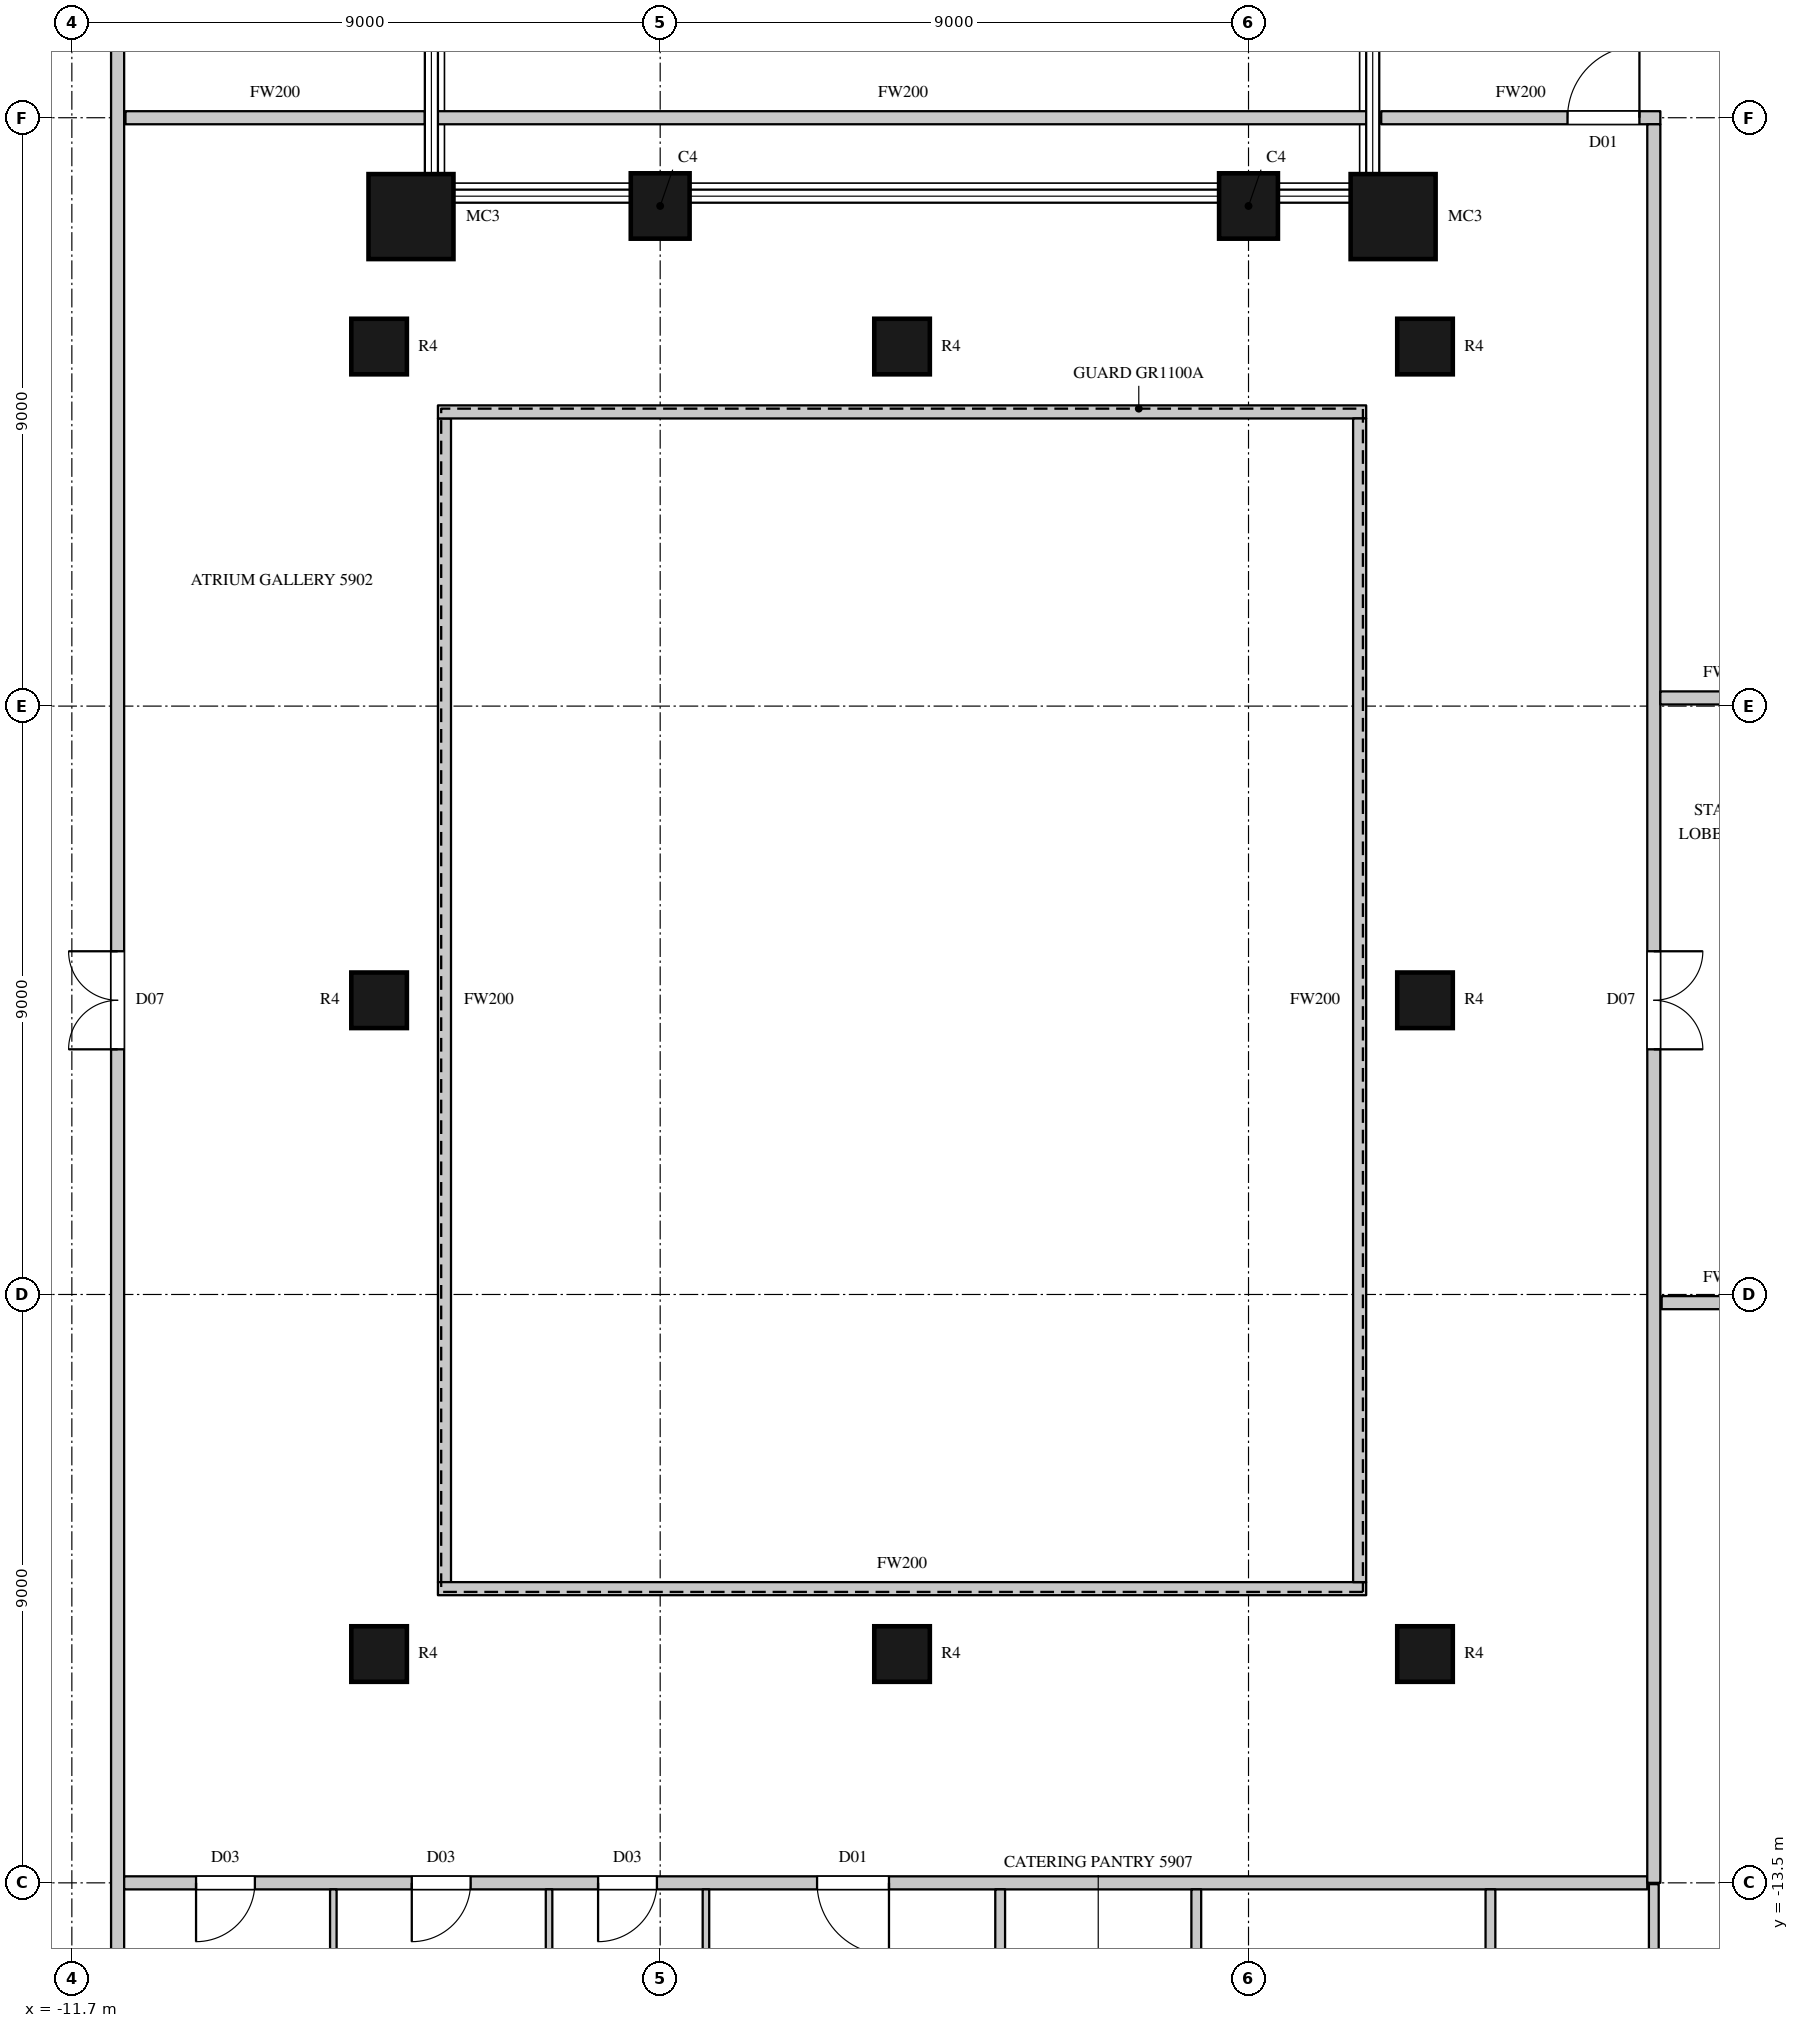
"""IFC4 building model, lengths in metres.
Left out: names, types, materials, properties, quantities, classifications, styles, units other than length and angle.
Written with IfcOpenShell. Run it as: python <this file> out.ifc"""

import sys

from ifc_helpers import new_model, si_unit, direction, frame, frame_2d, origin, origin_2d, place, context, subcontext, project, spatial, rectangle, circle, extrude, element, fill, save


model = new_model("IFC4")
c1 = context("Model", 3, precision=1e-05, world=origin(), true_north=direction((0.0, 1.0)))
c2 = subcontext(c1, "Body", "Model", "MODEL_VIEW")
j1 = project(units=[si_unit("LENGTHUNIT", "METRE"), si_unit("PLANEANGLEUNIT", "RADIAN")], contexts=[c1])
p1 = place(None, origin())
s1 = spatial("IfcSite", under=j1, at=p1, CompositionType="ELEMENT")
p2 = place(p1, origin())
s2 = spatial("IfcBuilding", under=s1, at=p2, CompositionType="ELEMENT")
p3 = place(p2, frame((0.0, 0.0, 263.9)))
s3 = spatial("IfcBuildingStorey", under=s2, at=p3, CompositionType="ELEMENT", Elevation=263.9)
p4 = place(p3, frame((8.512, 11.988, 0.0), z_axis=(0.0, 0.0, 1.0), x_axis=(1.0, 0.0, 0.0)))
e1 = element("IfcColumn", 1, at=p4, inside=s3, PredefinedType="COLUMN", context=c2, shape_type="SweptSolid", body=[
    extrude(circle(Radius=0.65, at=origin_2d()), origin(), (0.0, 0.0, 1.0), 4.1),
])
for number, where, z_axis, x_axis in (
    (2, (6.3, 12.15, 0.0), (0.0, 0.0, 1.0), (-1.0, 0.0, 0.0)),
    (3, (-2.7, 12.15, 0.0), (0.0, 0.0, 1.0), (-1.0, 0.0, 0.0)),
):
    element("IfcColumn", number, at=place(p3, frame(where, z_axis=z_axis, x_axis=x_axis)), inside=s3, PredefinedType="COLUMN", context=c2, shape_type="SweptSolid", body=[
        extrude(rectangle(XDim=0.9, YDim=1.0, at=origin_2d()), origin(), (0.0, 0.0, 1.0), 4.1),
    ])
p5 = place(p3, frame((-6.512, 11.988, 0.0), z_axis=(0.0, 0.0, 1.0), x_axis=(1.0, 0.0, 0.0)))
e4 = element("IfcColumn", 4, at=p5, inside=s3, PredefinedType="COLUMN", context=c2, shape_type="SweptSolid", body=[
    extrude(circle(Radius=0.65, at=origin_2d()), origin(), (0.0, 0.0, 1.0), 4.1),
])
for number, where, z_axis, x_axis in (
    (5, (-7.0, -10.0, 0.0), (0.0, 0.0, 1.0), (1.0, 0.0, 0.0)),
    (6, (-7.0, 0.0, 0.0), (0.0, 0.0, 1.0), (1.0, 0.0, 0.0)),
    (7, (-7.0, 10.0, 0.0), (0.0, 0.0, 1.0), (1.0, 0.0, 0.0)),
    (8, (1.0, -10.0, 0.0), (0.0, 0.0, 1.0), (1.0, 0.0, 0.0)),
    (9, (1.0, 10.0, 0.0), (0.0, 0.0, 1.0), (1.0, 0.0, 0.0)),
    (10, (9.0, -10.0, 0.0), (0.0, 0.0, 1.0), (1.0, 0.0, 0.0)),
    (11, (9.0, 0.0, 0.0), (0.0, 0.0, 1.0), (1.0, 0.0, 0.0)),
    (12, (9.0, 10.0, 0.0), (0.0, 0.0, 1.0), (1.0, 0.0, 0.0)),
):
    element("IfcColumn", number, at=place(p3, frame(where, z_axis=z_axis, x_axis=x_axis)), inside=s3, PredefinedType="COLUMN", context=c2, shape_type="SweptSolid", body=[
        extrude(circle(Radius=0.425, at=origin_2d()), origin(), (0.0, 0.0, 1.0), 4.1),
    ])
p6 = place(p3, frame((-11.0, -14.8, 0.0), z_axis=(0.0, 0.0, 1.0), x_axis=(0.0, 1.0, 0.0)))
e13 = element("IfcWall", 13, at=p6, inside=s3, PredefinedType="PARTITIONING", context=c2, shape_type="SweptSolid", body=[
    extrude(rectangle(XDim=29.5, YDim=0.2, at=frame_2d((14.75, 0.0))), origin(), (0.0, 0.0, 1.0), 3.8),
])
p7 = place(p6, frame((14.05, 0.0, 0.0)))
e14 = element("IfcOpeningElement", 14, at=p7, cuts=e13, PredefinedType="OPENING", context=c2, shape_type="SweptSolid", body=[
    extrude(rectangle(XDim=1.5, YDim=2.4, at=frame_2d((0.75, 1.2))), frame((0.0, 0.11, 0.0), z_axis=(0.0, -1.0, 0.0), x_axis=(1.0, 0.0, 0.0)), (0.0, 0.0, 1.0), 0.22),
])
p8 = place(p3, frame((-10.9, -13.5, 0.0), z_axis=(0.0, 0.0, 1.0), x_axis=(1.0, 0.0, 0.0)))
e15 = element("IfcWall", 15, at=p8, inside=s3, PredefinedType="PARTITIONING", context=c2, shape_type="SweptSolid", body=[
    extrude(rectangle(XDim=23.3, YDim=0.2, at=frame_2d((11.65, 0.0))), origin(), (0.0, 0.0, 1.0), 3.8),
])
p9 = place(p8, frame((1.1, 0.0, 0.0)))
e16 = element("IfcOpeningElement", 16, at=p9, cuts=e15, PredefinedType="OPENING", context=c2, shape_type="SweptSolid", body=[
    extrude(rectangle(XDim=0.9, YDim=2.2, at=frame_2d((0.45, 1.1))), frame((0.0, 0.11, 0.0), z_axis=(0.0, -1.0, 0.0), x_axis=(1.0, 0.0, 0.0)), (0.0, 0.0, 1.0), 0.22),
])
p10 = place(p8, frame((4.4, 0.0, 0.0)))
e17 = element("IfcOpeningElement", 17, at=p10, cuts=e15, PredefinedType="OPENING", context=c2, shape_type="SweptSolid", body=[
    extrude(rectangle(XDim=0.9, YDim=2.2, at=frame_2d((0.45, 1.1))), frame((0.0, 0.11, 0.0), z_axis=(0.0, -1.0, 0.0), x_axis=(1.0, 0.0, 0.0)), (0.0, 0.0, 1.0), 0.22),
])
p11 = place(p8, frame((7.25, 0.0, 0.0)))
e18 = element("IfcOpeningElement", 18, at=p11, cuts=e15, PredefinedType="OPENING", context=c2, shape_type="SweptSolid", body=[
    extrude(rectangle(XDim=0.9, YDim=2.2, at=frame_2d((0.45, 1.1))), frame((0.0, 0.11, 0.0), z_axis=(0.0, -1.0, 0.0), x_axis=(1.0, 0.0, 0.0)), (0.0, 0.0, 1.0), 0.22),
])
p12 = place(p8, frame((10.6, 0.0, 0.0)))
e19 = element("IfcOpeningElement", 19, at=p12, cuts=e15, PredefinedType="OPENING", context=c2, shape_type="SweptSolid", body=[
    extrude(rectangle(XDim=1.1, YDim=2.4, at=frame_2d((0.55, 1.2))), frame((0.0, 0.11, 0.0), z_axis=(0.0, -1.0, 0.0), x_axis=(1.0, 0.0, 0.0)), (0.0, 0.0, 1.0), 0.22),
])
p13 = place(p3, frame((-10.88, 13.5, 0.0), z_axis=(0.0, 0.0, 1.0), x_axis=(1.0, 0.0, 0.0)))
e20 = element("IfcWall", 20, at=p13, inside=s3, PredefinedType="PARTITIONING", context=c2, shape_type="SweptSolid", body=[
    extrude(rectangle(XDim=4.58, YDim=0.2, at=frame_2d((2.29, 0.0))), origin(), (0.0, 0.0, 1.0), 3.8),
])
p14 = place(p3, frame((-6.27, 13.5, 0.0), z_axis=(0.0, 0.0, 1.0), x_axis=(1.0, 0.0, 0.0)))
e21 = element("IfcWall", 21, at=p14, inside=s3, PredefinedType="PARTITIONING", context=c2, shape_type="SweptSolid", body=[
    extrude(rectangle(XDim=14.57, YDim=0.2, at=frame_2d((7.285, 0.0))), origin(), (0.0, 0.0, 1.0), 3.8),
])
p15 = place(p3, frame((-6.0, -8.9, 0.0), z_axis=(0.0, 0.0, 1.0), x_axis=(0.0, 1.0, 0.0)))
e22 = element("IfcWall", 22, at=p15, inside=s3, PredefinedType="PARTITIONING", context=c2, shape_type="SweptSolid", body=[
    extrude(rectangle(XDim=17.8, YDim=0.2, at=frame_2d((8.9, 0.0))), origin(), (0.0, 0.0, 1.0), 3.8),
])
for number, where, z_axis, x_axis in (
    (23, (-6.1, -9.0, 0.0), (0.0, 0.0, 1.0), (1.0, 0.0, 0.0)),
    (24, (-6.1, 9.0, 0.0), (0.0, 0.0, 1.0), (1.0, 0.0, 0.0)),
):
    element("IfcWall", number, at=place(p3, frame(where, z_axis=z_axis, x_axis=x_axis)), inside=s3, PredefinedType="PARTITIONING", context=c2, shape_type="SweptSolid", body=[
        extrude(rectangle(XDim=14.2, YDim=0.2, at=frame_2d((7.1, 0.0))), origin(), (0.0, 0.0, 1.0), 3.8),
    ])
p16 = place(p3, frame((8.0, -8.9, 0.0), z_axis=(0.0, 0.0, 1.0), x_axis=(0.0, 1.0, 0.0)))
e25 = element("IfcWall", 25, at=p16, inside=s3, PredefinedType="PARTITIONING", context=c2, shape_type="SweptSolid", body=[
    extrude(rectangle(XDim=17.8, YDim=0.2, at=frame_2d((8.9, 0.0))), origin(), (0.0, 0.0, 1.0), 3.8),
])
p17 = place(p3, frame((8.33, 13.5, 0.0), z_axis=(0.0, 0.0, 1.0), x_axis=(1.0, 0.0, 0.0)))
e26 = element("IfcWall", 26, at=p17, inside=s3, PredefinedType="PARTITIONING", context=c2, shape_type="SweptSolid", body=[
    extrude(rectangle(XDim=4.27, YDim=0.2, at=frame_2d((2.135, 0.0))), origin(), (0.0, 0.0, 1.0), 3.8),
])
p18 = place(p17, frame((2.85, 0.0, 0.0)))
e27 = element("IfcOpeningElement", 27, at=p18, cuts=e26, PredefinedType="OPENING", context=c2, shape_type="SweptSolid", body=[
    extrude(rectangle(XDim=1.1, YDim=2.4, at=frame_2d((0.55, 1.2))), frame((0.0, 0.11, 0.0), z_axis=(0.0, -1.0, 0.0), x_axis=(1.0, 0.0, 0.0)), (0.0, 0.0, 1.0), 0.22),
])
p19 = place(p3, frame((12.5, -13.5, 0.0), z_axis=(0.0, 0.0, 1.0), x_axis=(0.0, 1.0, 0.0)))
e28 = element("IfcWall", 28, at=p19, inside=s3, PredefinedType="PARTITIONING", context=c2, shape_type="SweptSolid", body=[
    extrude(rectangle(XDim=26.9, YDim=0.2, at=frame_2d((13.45, 0.0))), origin(), (0.0, 0.0, 1.0), 3.8),
])
p20 = place(p19, frame((12.75, 0.0, 0.0)))
e29 = element("IfcOpeningElement", 29, at=p20, cuts=e28, PredefinedType="OPENING", context=c2, shape_type="SweptSolid", body=[
    extrude(rectangle(XDim=1.5, YDim=2.4, at=frame_2d((0.75, 1.2))), frame((0.0, 0.11, 0.0), z_axis=(0.0, -1.0, 0.0), x_axis=(1.0, 0.0, 0.0)), (0.0, 0.0, 1.0), 0.22),
])
p21 = place(p3, frame((12.6, 4.625, 0.0), z_axis=(0.0, 0.0, 1.0), x_axis=(1.0, 0.0, 0.0)))
e30 = element("IfcWall", 30, at=p21, inside=s3, PredefinedType="PARTITIONING", context=c2, shape_type="SweptSolid", body=[
    extrude(rectangle(XDim=2.075, YDim=0.2, at=frame_2d((1.038, 0.0))), origin(), (0.0, 0.0, 1.0), 3.8),
])
p22 = place(p3, frame((12.62, -4.625, 0.0), z_axis=(0.0, 0.0, 1.0), x_axis=(1.0, 0.0, 0.0)))
e31 = element("IfcWall", 31, at=p22, inside=s3, PredefinedType="PARTITIONING", context=c2, shape_type="SweptSolid", body=[
    extrude(rectangle(XDim=2.035, YDim=0.2, at=frame_2d((1.018, 0.0))), origin(), (0.0, 0.0, 1.0), 3.8),
])
p23 = place(p3, frame((2.501, -17.625, 0.0), z_axis=(0.0, 0.0, 1.0), x_axis=(0.0, 1.0, 0.0)))
e32 = element("IfcWall", 32, at=p23, inside=s3, PredefinedType="PARTITIONING", context=c2, shape_type="SweptSolid", body=[
    extrude(rectangle(XDim=4.025, YDim=0.15, at=frame_2d((2.012, 0.0))), origin(), (0.0, 0.0, 1.0), 3.8),
])
p24 = place(p23, frame((1.55, 0.0, 0.0)))
e33 = element("IfcOpeningElement", 33, at=p24, cuts=e32, PredefinedType="OPENING", context=c2, shape_type="SweptSolid", body=[
    extrude(rectangle(XDim=0.95, YDim=2.2, at=frame_2d((0.475, 1.1))), frame((0.0, 0.085, 0.0), z_axis=(0.0, -1.0, 0.0), x_axis=(1.0, 0.0, 0.0)), (0.0, 0.0, 1.0), 0.17),
])
for number, where, z_axis, x_axis in (
    (34, (5.501, -17.625, 0.0), (0.0, 0.0, 1.0), (0.0, 1.0, 0.0)),
    (35, (10.001, -17.625, 0.0), (0.0, 0.0, 1.0), (0.0, 1.0, 0.0)),
):
    element("IfcWall", number, at=place(p3, frame(where, z_axis=z_axis, x_axis=x_axis)), inside=s3, PredefinedType="PARTITIONING", context=c2, shape_type="SweptSolid", body=[
        extrude(rectangle(XDim=4.025, YDim=0.15, at=frame_2d((2.012, 0.0))), origin(), (0.0, 0.0, 1.0), 3.8),
    ])
p25 = place(p3, frame((12.5, -20.095, 0.0), z_axis=(0.0, 0.0, 1.0), x_axis=(0.0, 1.0, 0.0)))
e36 = element("IfcWall", 36, at=p25, inside=s3, PredefinedType="PARTITIONING", context=c2, shape_type="SweptSolid", body=[
    extrude(rectangle(XDim=6.575, YDim=0.15, at=frame_2d((3.288, 0.0))), origin(), (0.0, 0.0, 1.0), 3.8),
])
for number, where, z_axis, x_axis in (
    (37, (-7.7, -24.04, 0.0), (0.0, 0.0, 1.0), (0.0, 1.0, 0.0)),
    (38, (-4.4, -24.04, 0.0), (0.0, 0.0, 1.0), (0.0, 1.0, 0.0)),
):
    element("IfcWall", number, at=place(p3, frame(where, z_axis=z_axis, x_axis=x_axis)), inside=s3, PredefinedType="PARTITIONING", context=c2, shape_type="SweptSolid", body=[
        extrude(rectangle(XDim=10.44, YDim=0.1, at=frame_2d((5.22, 0.0))), origin(), (0.0, 0.0, 1.0), 3.8),
    ])
p26 = place(p3, frame((-2.0, -23.447, 0.0), z_axis=(0.0, 0.0, 1.0), x_axis=(0.0, 1.0, 0.0)))
e39 = element("IfcWall", 39, at=p26, inside=s3, PredefinedType="PARTITIONING", context=c2, shape_type="SweptSolid", body=[
    extrude(rectangle(XDim=9.847, YDim=0.1, at=frame_2d((4.924, 0.0))), origin(), (0.0, 0.0, 1.0), 3.8),
])
p27 = place(p7, origin())
e40 = element("IfcDoor", 40, at=p27, inside=s3, OperationType="DOUBLE_DOOR_SINGLE_SWING", PredefinedType="DOOR", context=c2, shape_type="SweptSolid", body=[
    extrude(rectangle(XDim=1.5, YDim=2.4, at=frame_2d((0.75, 1.2))), frame((0.0, 0.025, 0.0), z_axis=(0.0, -1.0, 0.0), x_axis=(1.0, 0.0, 0.0)), (0.0, 0.0, 1.0), 0.05),
])
fill(e14, e40)
p28 = place(p20, origin())
e41 = element("IfcDoor", 41, at=p28, inside=s3, OperationType="DOUBLE_DOOR_SINGLE_SWING", PredefinedType="DOOR", context=c2, shape_type="SweptSolid", body=[
    extrude(rectangle(XDim=1.5, YDim=2.4, at=frame_2d((0.75, 1.2))), frame((0.0, 0.025, 0.0), z_axis=(0.0, -1.0, 0.0), x_axis=(1.0, 0.0, 0.0)), (0.0, 0.0, 1.0), 0.05),
])
fill(e29, e41)
p29 = place(p9, origin())
e42 = element("IfcDoor", 42, at=p29, inside=s3, OperationType="SINGLE_SWING_RIGHT", PredefinedType="DOOR", context=c2, shape_type="SweptSolid", body=[
    extrude(rectangle(XDim=0.9, YDim=2.2, at=frame_2d((0.45, 1.1))), frame((0.0, 0.025, 0.0), z_axis=(0.0, -1.0, 0.0), x_axis=(1.0, 0.0, 0.0)), (0.0, 0.0, 1.0), 0.05),
])
fill(e16, e42)
p30 = place(p10, origin())
e43 = element("IfcDoor", 43, at=p30, inside=s3, OperationType="SINGLE_SWING_RIGHT", PredefinedType="DOOR", context=c2, shape_type="SweptSolid", body=[
    extrude(rectangle(XDim=0.9, YDim=2.2, at=frame_2d((0.45, 1.1))), frame((0.0, 0.025, 0.0), z_axis=(0.0, -1.0, 0.0), x_axis=(1.0, 0.0, 0.0)), (0.0, 0.0, 1.0), 0.05),
])
fill(e17, e43)
p31 = place(p11, origin())
e44 = element("IfcDoor", 44, at=p31, inside=s3, OperationType="SINGLE_SWING_RIGHT", PredefinedType="DOOR", context=c2, shape_type="SweptSolid", body=[
    extrude(rectangle(XDim=0.9, YDim=2.2, at=frame_2d((0.45, 1.1))), frame((0.0, 0.025, 0.0), z_axis=(0.0, -1.0, 0.0), x_axis=(1.0, 0.0, 0.0)), (0.0, 0.0, 1.0), 0.05),
])
fill(e18, e44)
p32 = place(p12, origin())
e45 = element("IfcDoor", 45, at=p32, inside=s3, OperationType="SINGLE_SWING_LEFT", PredefinedType="DOOR", context=c2, shape_type="SweptSolid", body=[
    extrude(rectangle(XDim=1.1, YDim=2.4, at=frame_2d((0.55, 1.2))), frame((0.0, 0.025, 0.0), z_axis=(0.0, -1.0, 0.0), x_axis=(1.0, 0.0, 0.0)), (0.0, 0.0, 1.0), 0.05),
])
fill(e19, e45)
p33 = place(p18, origin())
e46 = element("IfcDoor", 46, at=p33, inside=s3, OperationType="SINGLE_SWING_RIGHT", PredefinedType="DOOR", context=c2, shape_type="SweptSolid", body=[
    extrude(rectangle(XDim=1.1, YDim=2.4, at=frame_2d((0.55, 1.2))), frame((0.0, 0.025, 0.0), z_axis=(0.0, -1.0, 0.0), x_axis=(1.0, 0.0, 0.0)), (0.0, 0.0, 1.0), 0.05),
])
fill(e27, e46)
save(model, sys.argv[1])
